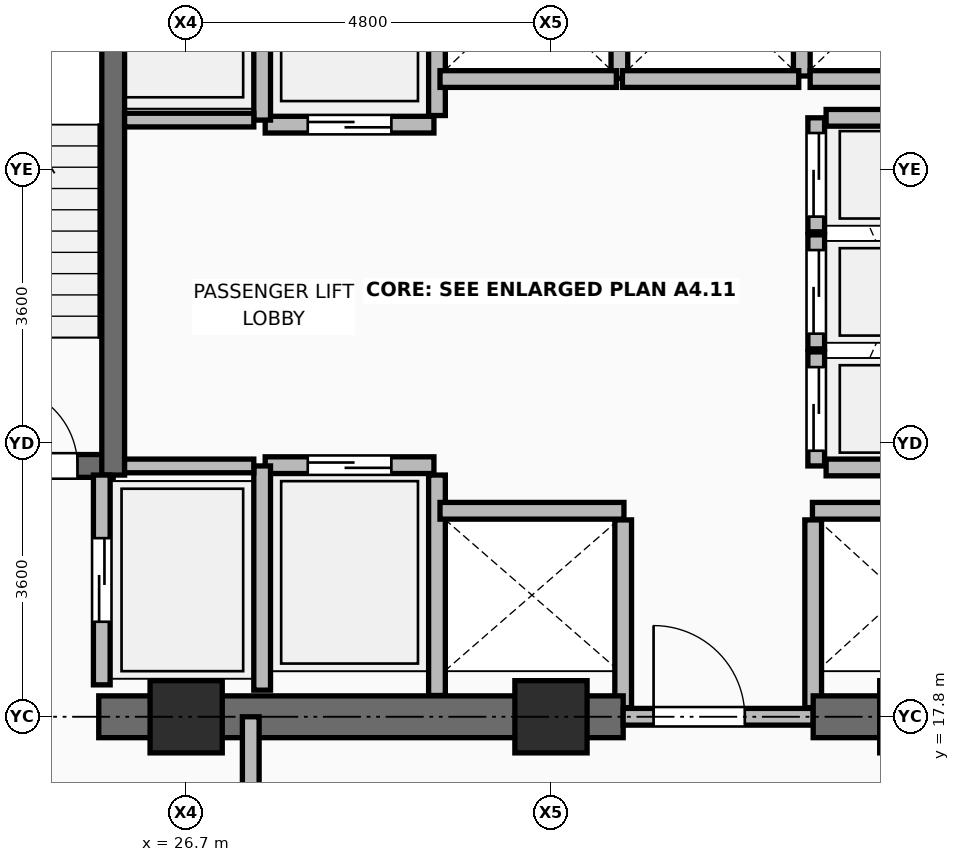
"""IFC4 building model, lengths in metres.
Left out: names, types, materials, properties, quantities, classifications, styles, units other than length and angle.
Written with IfcOpenShell. Run it as: python <this file> out.ifc"""

import sys

from ifc_helpers import new_model, si_unit, direction, frame, frame_2d, origin, origin_2d, place, context, subcontext, project, spatial, rectangle, extrude, element, fill, save


model = new_model("IFC4")
c1 = context("Model", 3, precision=1e-05, world=origin(), true_north=direction((0.0, 1.0)))
c2 = subcontext(c1, "Body", "Model", "MODEL_VIEW")
j1 = project(units=[si_unit("LENGTHUNIT", "METRE"), si_unit("PLANEANGLEUNIT", "RADIAN")], contexts=[c1])
p1 = place(None, origin())
s1 = spatial("IfcSite", under=j1, at=p1, CompositionType="ELEMENT")
p2 = place(p1, origin())
s2 = spatial("IfcBuilding", under=s1, at=p2, CompositionType="ELEMENT")
p3 = place(p2, frame((0.0, 0.0, 153.45)))
s3 = spatial("IfcBuildingStorey", under=s2, at=p3, CompositionType="ELEMENT", Elevation=153.45)
for number, where, z_axis, x_axis in (
    (1, (26.7, 17.8, 0.0), (0.0, 0.0, 1.0), (1.0, 0.0, 0.0)),
    (2, (31.5, 17.8, 0.0), (0.0, 0.0, 1.0), (1.0, 0.0, 0.0)),
    (3, (36.3, 17.8, 0.0), (0.0, 0.0, 1.0), (1.0, 0.0, 0.0)),
):
    element("IfcColumn", number, at=place(p3, frame(where, z_axis=z_axis, x_axis=x_axis)), inside=s3, PredefinedType="COLUMN", context=c2, shape_type="SweptSolid", body=[
        extrude(rectangle(XDim=0.95, YDim=0.95, at=origin_2d()), origin(), (0.0, 0.0, 1.0), 3.75),
    ])
p4 = place(p3, frame((30.0, 18.08, 0.0), z_axis=(0.0, 0.0, 1.0), x_axis=(0.0, 1.0, 0.0)))
e4 = element("IfcWall", 4, at=p4, inside=s3, PredefinedType="PARTITIONING", context=c2, shape_type="SweptSolid", body=[
    extrude(rectangle(XDim=2.9, YDim=0.22, at=frame_2d((1.45, 0.0))), origin(), (0.0, 0.0, 1.0), 3.545),
])
for number, where, z_axis, x_axis in (
    (5, (32.45, 17.92, 0.0), (0.0, 0.0, 1.0), (0.0, 1.0, 0.0)),
    (6, (34.95, 17.92, 0.0), (0.0, 0.0, 1.0), (0.0, 1.0, 0.0)),
):
    element("IfcWall", number, at=place(p3, frame(where, z_axis=z_axis, x_axis=x_axis)), inside=s3, PredefinedType="PARTITIONING", context=c2, shape_type="SweptSolid", body=[
        extrude(rectangle(XDim=2.47, YDim=0.22, at=frame_2d((1.235, 0.0))), origin(), (0.0, 0.0, 1.0), 3.006),
    ])
p5 = place(p3, frame((30.0, 25.71, 0.0), z_axis=(0.0, 0.0, 1.0), x_axis=(0.0, 1.0, 0.0)))
e7 = element("IfcWall", 7, at=p5, inside=s3, PredefinedType="PARTITIONING", context=c2, shape_type="SweptSolid", body=[
    extrude(rectangle(XDim=2.73, YDim=0.22, at=frame_2d((1.365, 0.0))), origin(), (0.0, 0.0, 1.0), 3.545),
])
p6 = place(p3, frame((32.4, 26.2, 0.0), z_axis=(0.0, 0.0, 1.0), x_axis=(0.0, 1.0, 0.0)))
e8 = element("IfcWall", 8, at=p6, inside=s3, PredefinedType="PARTITIONING", context=c2, shape_type="SweptSolid", body=[
    extrude(rectangle(XDim=2.24, YDim=0.22, at=frame_2d((1.12, 0.0))), origin(), (0.0, 0.0, 1.0), 3.545),
])
p7 = place(p3, frame((34.8, 26.23, 0.0), z_axis=(0.0, 0.0, 1.0), x_axis=(0.0, 1.0, 0.0)))
e9 = element("IfcWall", 9, at=p7, inside=s3, PredefinedType="PARTITIONING", context=c2, shape_type="SweptSolid", body=[
    extrude(rectangle(XDim=2.21, YDim=0.22, at=frame_2d((1.105, 0.0))), origin(), (0.0, 0.0, 1.0), 3.545),
])
p8 = place(p3, frame((34.91, 26.19, 0.0), z_axis=(0.0, 0.0, 1.0), x_axis=(1.0, 0.0, 0.0)))
e10 = element("IfcWall", 10, at=p8, inside=s3, PredefinedType="PARTITIONING", context=c2, shape_type="SweptSolid", body=[
    extrude(rectangle(XDim=2.14, YDim=0.22, at=frame_2d((1.07, 0.0))), origin(), (0.0, 0.0, 1.0), 3.545),
])
p9 = place(p3, frame((25.55, 17.8, 0.0), z_axis=(0.0, 0.0, 1.0), x_axis=(1.0, 0.0, 0.0)))
e11 = element("IfcWall", 11, at=p9, inside=s3, PredefinedType="SHEAR", context=c2, shape_type="SweptSolid", body=[
    extrude(rectangle(XDim=6.9, YDim=0.55, at=frame_2d((3.45, 0.0))), origin(), (0.0, 0.0, 1.0), 3.57),
])
p10 = place(p3, frame((32.45, 17.8, 0.0), z_axis=(0.0, 0.0, 1.0), x_axis=(1.0, 0.0, 0.0)))
e12 = element("IfcWall", 12, at=p10, inside=s3, PredefinedType="PARTITIONING", context=c2, shape_type="SweptSolid", body=[
    extrude(rectangle(XDim=2.5, YDim=0.22, at=frame_2d((1.25, 0.0))), origin(), (0.0, 0.0, 1.0), 3.006),
])
p11 = place(p10, frame((0.4, 0.0, 0.0)))
e13 = element("IfcOpeningElement", 13, at=p11, cuts=e12, PredefinedType="OPENING", context=c2, shape_type="SweptSolid", body=[
    extrude(rectangle(XDim=1.2, YDim=2.1, at=frame_2d((0.6, 1.05))), frame((0.0, 0.12, 0.0), z_axis=(0.0, -1.0, 0.0), x_axis=(1.0, 0.0, 0.0)), (0.0, 0.0, 1.0), 0.24),
])
p12 = place(p3, frame((34.95, 17.8, 0.0), z_axis=(0.0, 0.0, 1.0), x_axis=(1.0, 0.0, 0.0)))
e14 = element("IfcWall", 14, at=p12, inside=s3, PredefinedType="SHEAR", context=c2, shape_type="SweptSolid", body=[
    extrude(rectangle(XDim=6.425, YDim=0.55, at=frame_2d((3.212, 0.0))), origin(), (0.0, 0.0, 1.0), 3.57),
])
p13 = place(p3, frame((22.175, 21.1, 0.0), z_axis=(0.0, 0.0, 1.0), x_axis=(1.0, 0.0, 0.0)))
e15 = element("IfcWall", 15, at=p13, inside=s3, PredefinedType="SHEAR", context=c2, shape_type="SweptSolid", body=[
    extrude(rectangle(XDim=3.565, YDim=0.3, at=frame_2d((1.782, 0.0))), origin(), (0.0, 0.0, 1.0), 3.57),
])
p14 = place(p13, frame((2.045, 0.0, 0.0)))
e16 = element("IfcOpeningElement", 16, at=p14, cuts=e15, PredefinedType="OPENING", context=c2, shape_type="SweptSolid", body=[
    extrude(rectangle(XDim=1.05, YDim=2.1, at=frame_2d((0.525, 1.05))), frame((0.0, 0.16, 0.0), z_axis=(0.0, -1.0, 0.0), x_axis=(1.0, 0.0, 0.0)), (0.0, 0.0, 1.0), 0.32),
])
p15 = place(p3, frame((25.74, 20.98, 0.0), z_axis=(0.0, 0.0, 1.0), x_axis=(0.0, 1.0, 0.0)))
e17 = element("IfcWall", 17, at=p15, inside=s3, PredefinedType="SHEAR", context=c2, shape_type="SweptSolid", body=[
    extrude(rectangle(XDim=7.99, YDim=0.3, at=frame_2d((3.995, 0.0))), origin(), (0.0, 0.0, 1.0), 3.57),
])
p16 = place(p3, frame((25.59, 18.22, 0.0), z_axis=(0.0, 0.0, 1.0), x_axis=(0.0, 1.0, 0.0)))
e18 = element("IfcWall", 18, at=p16, inside=s3, PredefinedType="PARTITIONING", context=c2, shape_type="SweptSolid", body=[
    extrude(rectangle(XDim=2.76, YDim=0.22, at=frame_2d((1.38, 0.0))), origin(), (0.0, 0.0, 1.0), 3.55),
])
p17 = place(p16, frame((0.83, 0.0, 0.0)))
e19 = element("IfcOpeningElement", 19, at=p17, cuts=e18, PredefinedType="OPENING", context=c2, shape_type="SweptSolid", body=[
    extrude(rectangle(XDim=1.1, YDim=2.2, at=frame_2d((0.55, 1.1))), frame((0.0, 0.12, 0.0), z_axis=(0.0, -1.0, 0.0), x_axis=(1.0, 0.0, 0.0)), (0.0, 0.0, 1.0), 0.24),
])
p18 = place(p3, frame((27.74, 21.11, 0.0), z_axis=(0.0, 0.0, 1.0), x_axis=(1.0, 0.0, 0.0)))
e20 = element("IfcWall", 20, at=p18, inside=s3, PredefinedType="PARTITIONING", context=c2, shape_type="SweptSolid", body=[
    extrude(rectangle(XDim=2.22, YDim=0.22, at=frame_2d((1.11, 0.0))), origin(), (0.0, 0.0, 1.0), 3.55),
])
p19 = place(p18, frame((0.56, 0.0, 0.0)))
e21 = element("IfcOpeningElement", 21, at=p19, cuts=e20, PredefinedType="OPENING", context=c2, shape_type="SweptSolid", body=[
    extrude(rectangle(XDim=1.1, YDim=2.2, at=frame_2d((0.55, 1.1))), frame((0.0, 0.12, 0.0), z_axis=(0.0, -1.0, 0.0), x_axis=(1.0, 0.0, 0.0)), (0.0, 0.0, 1.0), 0.24),
])
p20 = place(p3, frame((27.74, 25.59, 0.0), z_axis=(0.0, 0.0, 1.0), x_axis=(1.0, 0.0, 0.0)))
e22 = element("IfcWall", 22, at=p20, inside=s3, PredefinedType="PARTITIONING", context=c2, shape_type="SweptSolid", body=[
    extrude(rectangle(XDim=2.22, YDim=0.22, at=frame_2d((1.11, 0.0))), origin(), (0.0, 0.0, 1.0), 3.55),
])
p21 = place(p20, frame((0.56, 0.0, 0.0)))
e23 = element("IfcOpeningElement", 23, at=p21, cuts=e22, PredefinedType="OPENING", context=c2, shape_type="SweptSolid", body=[
    extrude(rectangle(XDim=1.1, YDim=2.2, at=frame_2d((0.55, 1.1))), frame((0.0, 0.12, 0.0), z_axis=(0.0, -1.0, 0.0), x_axis=(1.0, 0.0, 0.0)), (0.0, 0.0, 1.0), 0.24),
])
p22 = place(p3, frame((30.04, 20.51, 0.0), z_axis=(0.0, 0.0, 1.0), x_axis=(1.0, 0.0, 0.0)))
e24 = element("IfcWall", 24, at=p22, inside=s3, PredefinedType="PARTITIONING", context=c2, shape_type="SweptSolid", body=[
    extrude(rectangle(XDim=2.42, YDim=0.22, at=frame_2d((1.21, 0.0))), origin(), (0.0, 0.0, 1.0), 3.55),
])
p23 = place(p3, frame((34.94, 20.51, 0.0), z_axis=(0.0, 0.0, 1.0), x_axis=(1.0, 0.0, 0.0)))
e25 = element("IfcWall", 25, at=p23, inside=s3, PredefinedType="PARTITIONING", context=c2, shape_type="SweptSolid", body=[
    extrude(rectangle(XDim=2.24, YDim=0.22, at=frame_2d((1.12, 0.0))), origin(), (0.0, 0.0, 1.0), 3.55),
])
for number, where, z_axis, x_axis in (
    (26, (30.04, 26.19, 0.0), (0.0, 0.0, 1.0), (1.0, 0.0, 0.0)),
    (27, (32.44, 26.19, 0.0), (0.0, 0.0, 1.0), (1.0, 0.0, 0.0)),
):
    element("IfcWall", number, at=place(p3, frame(where, z_axis=z_axis, x_axis=x_axis)), inside=s3, PredefinedType="PARTITIONING", context=c2, shape_type="SweptSolid", body=[
        extrude(rectangle(XDim=2.32, YDim=0.22, at=frame_2d((1.16, 0.0))), origin(), (0.0, 0.0, 1.0), 3.55),
    ])
p24 = place(p3, frame((34.99, 21.1, 0.0), z_axis=(0.0, 0.0, 1.0), x_axis=(0.0, 1.0, 0.0)))
e28 = element("IfcWall", 28, at=p24, inside=s3, PredefinedType="PARTITIONING", context=c2, shape_type="SweptSolid", body=[
    extrude(rectangle(XDim=1.5, YDim=0.22, at=frame_2d((0.75, 0.0))), origin(), (0.0, 0.0, 1.0), 3.55),
])
p25 = place(p24, frame((0.2, 0.0, 0.0)))
e29 = element("IfcOpeningElement", 29, at=p25, cuts=e28, PredefinedType="OPENING", context=c2, shape_type="SweptSolid", body=[
    extrude(rectangle(XDim=1.1, YDim=2.2, at=frame_2d((0.55, 1.1))), frame((0.0, 0.12, 0.0), z_axis=(0.0, -1.0, 0.0), x_axis=(1.0, 0.0, 0.0)), (0.0, 0.0, 1.0), 0.24),
])
p26 = place(p3, frame((34.99, 22.64, 0.0), z_axis=(0.0, 0.0, 1.0), x_axis=(0.0, 1.0, 0.0)))
e30 = element("IfcWall", 30, at=p26, inside=s3, PredefinedType="PARTITIONING", context=c2, shape_type="SweptSolid", body=[
    extrude(rectangle(XDim=1.5, YDim=0.22, at=frame_2d((0.75, 0.0))), origin(), (0.0, 0.0, 1.0), 3.55),
])
p27 = place(p26, frame((0.2, 0.0, 0.0)))
e31 = element("IfcOpeningElement", 31, at=p27, cuts=e30, PredefinedType="OPENING", context=c2, shape_type="SweptSolid", body=[
    extrude(rectangle(XDim=1.1, YDim=2.2, at=frame_2d((0.55, 1.1))), frame((0.0, 0.12, 0.0), z_axis=(0.0, -1.0, 0.0), x_axis=(1.0, 0.0, 0.0)), (0.0, 0.0, 1.0), 0.24),
])
p28 = place(p3, frame((34.99, 24.18, 0.0), z_axis=(0.0, 0.0, 1.0), x_axis=(0.0, 1.0, 0.0)))
e32 = element("IfcWall", 32, at=p28, inside=s3, PredefinedType="PARTITIONING", context=c2, shape_type="SweptSolid", body=[
    extrude(rectangle(XDim=1.5, YDim=0.22, at=frame_2d((0.75, 0.0))), origin(), (0.0, 0.0, 1.0), 3.55),
])
p29 = place(p28, frame((0.2, 0.0, 0.0)))
e33 = element("IfcOpeningElement", 33, at=p29, cuts=e32, PredefinedType="OPENING", context=c2, shape_type="SweptSolid", body=[
    extrude(rectangle(XDim=1.1, YDim=2.2, at=frame_2d((0.55, 1.1))), frame((0.0, 0.12, 0.0), z_axis=(0.0, -1.0, 0.0), x_axis=(1.0, 0.0, 0.0)), (0.0, 0.0, 1.0), 0.24),
])
p30 = place(p3, frame((27.7, 18.15, 0.0), z_axis=(0.0, 0.0, 1.0), x_axis=(0.0, 1.0, 0.0)))
e34 = element("IfcWall", 34, at=p30, inside=s3, PredefinedType="PARTITIONING", context=c2, shape_type="SweptSolid", body=[
    extrude(rectangle(XDim=2.95, YDim=0.22, at=frame_2d((1.475, 0.0))), origin(), (0.0, 0.0, 1.0), 3.55),
])
p31 = place(p3, frame((27.7, 25.65, 0.0), z_axis=(0.0, 0.0, 1.0), x_axis=(0.0, 1.0, 0.0)))
e35 = element("IfcWall", 35, at=p31, inside=s3, PredefinedType="PARTITIONING", context=c2, shape_type="SweptSolid", body=[
    extrude(rectangle(XDim=3.0, YDim=0.22, at=frame_2d((1.5, 0.0))), origin(), (0.0, 0.0, 1.0), 3.55),
])
for number, where, z_axis, x_axis in (
    (36, (35.12, 21.08, 0.0), (0.0, 0.0, 1.0), (1.0, 0.0, 0.0)),
    (37, (35.12, 25.68, 0.0), (0.0, 0.0, 1.0), (1.0, 0.0, 0.0)),
):
    element("IfcWall", number, at=place(p3, frame(where, z_axis=z_axis, x_axis=x_axis)), inside=s3, PredefinedType="PARTITIONING", context=c2, shape_type="SweptSolid", body=[
        extrude(rectangle(XDim=1.94, YDim=0.22, at=frame_2d((0.97, 0.0))), origin(), (0.0, 0.0, 1.0), 3.55),
    ])
for number, where, z_axis, x_axis in (
    (38, (25.89, 21.1, 0.0), (0.0, 0.0, 1.0), (1.0, 0.0, 0.0)),
    (39, (25.89, 25.65, 0.0), (0.0, 0.0, 1.0), (1.0, 0.0, 0.0)),
):
    element("IfcWall", number, at=place(p3, frame(where, z_axis=z_axis, x_axis=x_axis)), inside=s3, PredefinedType="PARTITIONING", context=c2, shape_type="SweptSolid", body=[
        extrude(rectangle(XDim=1.7, YDim=0.18, at=frame_2d((0.85, 0.0))), origin(), (0.0, 0.0, 1.0), 3.55),
    ])
p32 = place(p3, frame((27.55, 14.35, 0.0), z_axis=(0.0, 0.0, 1.0), x_axis=(0.0, 1.0, 0.0)))
e40 = element("IfcWall", 40, at=p32, inside=s3, PredefinedType="PARTITIONING", context=c2, shape_type="SweptSolid", body=[
    extrude(rectangle(XDim=3.45, YDim=0.22, at=frame_2d((1.725, 0.0))), origin(), (0.0, 0.0, 1.0), 3.006),
])
p33 = place(p32, frame((1.175, 0.0, 0.0)))
e41 = element("IfcOpeningElement", 41, at=p33, cuts=e40, PredefinedType="OPENING", context=c2, shape_type="SweptSolid", body=[
    extrude(rectangle(XDim=1.1, YDim=2.1, at=frame_2d((0.55, 1.05))), frame((0.0, 0.12, 0.0), z_axis=(0.0, -1.0, 0.0), x_axis=(1.0, 0.0, 0.0)), (0.0, 0.0, 1.0), 0.24),
])
p34 = place(p11, origin())
e42 = element("IfcDoor", 42, at=p34, inside=s3, OperationType="SINGLE_SWING_LEFT", PredefinedType="DOOR", context=c2, shape_type="SweptSolid", body=[
    extrude(rectangle(XDim=1.2, YDim=2.1, at=frame_2d((0.6, 1.05))), frame((0.0, 0.025, 0.0), z_axis=(0.0, -1.0, 0.0), x_axis=(1.0, 0.0, 0.0)), (0.0, 0.0, 1.0), 0.05),
])
fill(e13, e42)
p35 = place(p14, origin())
e43 = element("IfcDoor", 43, at=p35, inside=s3, OperationType="SINGLE_SWING_LEFT", PredefinedType="DOOR", context=c2, shape_type="SweptSolid", body=[
    extrude(rectangle(XDim=1.05, YDim=2.1, at=frame_2d((0.525, 1.05))), frame((0.0, 0.025, 0.0), z_axis=(0.0, -1.0, 0.0), x_axis=(1.0, 0.0, 0.0)), (0.0, 0.0, 1.0), 0.05),
])
fill(e16, e43)
p36 = place(p17, origin())
e44 = element("IfcDoor", 44, at=p36, inside=s3, OperationType="DOUBLE_DOOR_SLIDING", PredefinedType="DOOR", context=c2, shape_type="SweptSolid", body=[
    extrude(rectangle(XDim=1.1, YDim=2.2, at=frame_2d((0.55, 1.1))), frame((0.0, 0.025, 0.0), z_axis=(0.0, -1.0, 0.0), x_axis=(1.0, 0.0, 0.0)), (0.0, 0.0, 1.0), 0.05),
])
fill(e19, e44)
p37 = place(p19, origin())
e45 = element("IfcDoor", 45, at=p37, inside=s3, OperationType="DOUBLE_DOOR_SLIDING", PredefinedType="DOOR", context=c2, shape_type="SweptSolid", body=[
    extrude(rectangle(XDim=1.1, YDim=2.2, at=frame_2d((0.55, 1.1))), frame((0.0, 0.025, 0.0), z_axis=(0.0, -1.0, 0.0), x_axis=(1.0, 0.0, 0.0)), (0.0, 0.0, 1.0), 0.05),
])
fill(e21, e45)
p38 = place(p21, frame((1.1, 0.0, 0.0), z_axis=(0.0, 0.0, 1.0), x_axis=(-1.0, 0.0, 0.0)))
e46 = element("IfcDoor", 46, at=p38, inside=s3, OperationType="DOUBLE_DOOR_SLIDING", PredefinedType="DOOR", context=c2, shape_type="SweptSolid", body=[
    extrude(rectangle(XDim=1.1, YDim=2.2, at=frame_2d((0.55, 1.1))), frame((0.0, 0.025, 0.0), z_axis=(0.0, -1.0, 0.0), x_axis=(1.0, 0.0, 0.0)), (0.0, 0.0, 1.0), 0.05),
])
fill(e23, e46)
p39 = place(p25, origin())
e47 = element("IfcDoor", 47, at=p39, inside=s3, OperationType="DOUBLE_DOOR_SLIDING", PredefinedType="DOOR", context=c2, shape_type="SweptSolid", body=[
    extrude(rectangle(XDim=1.1, YDim=2.2, at=frame_2d((0.55, 1.1))), frame((0.0, 0.025, 0.0), z_axis=(0.0, -1.0, 0.0), x_axis=(1.0, 0.0, 0.0)), (0.0, 0.0, 1.0), 0.05),
])
fill(e29, e47)
p40 = place(p27, origin())
e48 = element("IfcDoor", 48, at=p40, inside=s3, OperationType="DOUBLE_DOOR_SLIDING", PredefinedType="DOOR", context=c2, shape_type="SweptSolid", body=[
    extrude(rectangle(XDim=1.1, YDim=2.2, at=frame_2d((0.55, 1.1))), frame((0.0, 0.025, 0.0), z_axis=(0.0, -1.0, 0.0), x_axis=(1.0, 0.0, 0.0)), (0.0, 0.0, 1.0), 0.05),
])
fill(e31, e48)
p41 = place(p29, origin())
e49 = element("IfcDoor", 49, at=p41, inside=s3, OperationType="DOUBLE_DOOR_SLIDING", PredefinedType="DOOR", context=c2, shape_type="SweptSolid", body=[
    extrude(rectangle(XDim=1.1, YDim=2.2, at=frame_2d((0.55, 1.1))), frame((0.0, 0.025, 0.0), z_axis=(0.0, -1.0, 0.0), x_axis=(1.0, 0.0, 0.0)), (0.0, 0.0, 1.0), 0.05),
])
fill(e33, e49)
save(model, sys.argv[1])
